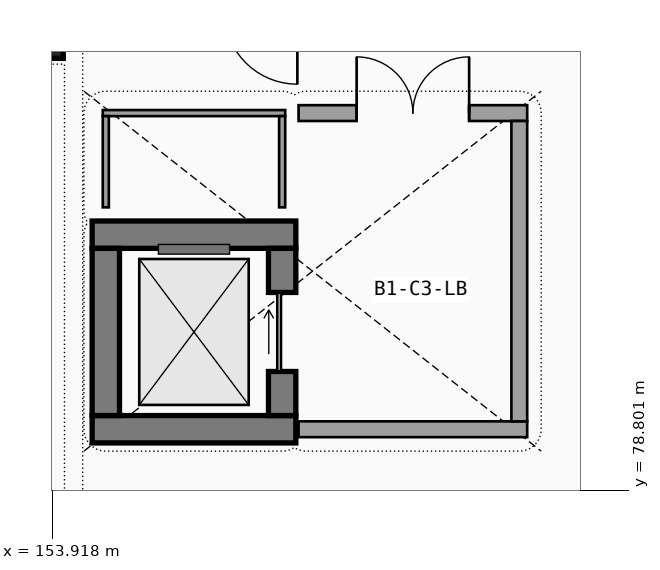
"""IFC4 building model, lengths in metres.
Left out: names, types, materials, properties, quantities, classifications, styles, units other than length and angle.
Written with IfcOpenShell. Run it as: python <this file> out.ifc"""

import sys

from ifc_helpers import new_model, si_unit, direction, frame, frame_2d, origin, origin_2d, place, context, subcontext, project, spatial, rectangle, extrude, element, fill, save


model = new_model("IFC4")
c1 = context("Model", 3, precision=1e-05, world=origin(), true_north=direction((0.0, 1.0)))
c2 = subcontext(c1, "Body", "Model", "MODEL_VIEW")
j1 = project(units=[si_unit("LENGTHUNIT", "METRE"), si_unit("PLANEANGLEUNIT", "RADIAN")], contexts=[c1])
p1 = place(None, origin())
s1 = spatial("IfcSite", under=j1, at=p1, CompositionType="ELEMENT")
p2 = place(p1, origin())
s2 = spatial("IfcBuilding", under=s1, at=p2, CompositionType="ELEMENT")
p3 = place(p2, frame((0.0, 0.0, -4.8)))
s3 = spatial("IfcBuildingStorey", under=s2, at=p3, CompositionType="ELEMENT", Elevation=-4.8)
p4 = place(p3, frame((153.6, 86.4, 0.0), z_axis=(0.0, 0.0, 1.0), x_axis=(1.0, 0.0, 0.0)))
e1 = element("IfcColumn", 1, at=p4, inside=s3, PredefinedType="COLUMN", context=c2, shape_type="SweptSolid", body=[
    extrude(rectangle(XDim=1.0, YDim=1.0, at=origin_2d()), origin(), (0.0, 0.0, 1.0), 4.8),
])
for number, where, z_axis, x_axis in (
    (2, (154.575, 79.8, 0.0), (0.0, 0.0, 1.0), (1.0, 0.0, 0.0)),
    (3, (157.925, 83.0, 0.0), (0.0, 0.0, 1.0), (-1.0, 0.0, 0.0)),
):
    element("IfcWall", number, at=place(p3, frame(where, z_axis=z_axis, x_axis=x_axis)), inside=s3, PredefinedType="SHEAR", context=c2, shape_type="SweptSolid", body=[
        extrude(rectangle(XDim=3.35, YDim=0.45, at=frame_2d((1.675, 0.0))), origin(), (0.0, 0.0, 1.0), 4.5),
    ])
p5 = place(p3, frame((154.8, 82.775, 0.0), z_axis=(0.0, 0.0, 1.0), x_axis=(0.0, -1.0, 0.0)))
e4 = element("IfcWall", 4, at=p5, inside=s3, PredefinedType="SHEAR", context=c2, shape_type="SweptSolid", body=[
    extrude(rectangle(XDim=2.75, YDim=0.45, at=frame_2d((1.375, 0.0))), origin(), (0.0, 0.0, 1.0), 4.5),
])
p6 = place(p3, frame((157.7, 80.025, 0.0), z_axis=(0.0, 0.0, 1.0), x_axis=(0.0, 1.0, 0.0)))
e5 = element("IfcWall", 5, at=p6, inside=s3, PredefinedType="SHEAR", context=c2, shape_type="SweptSolid", body=[
    extrude(rectangle(XDim=2.75, YDim=0.45, at=frame_2d((1.375, 0.0))), origin(), (0.0, 0.0, 1.0), 4.5),
])
p7 = place(p6, frame((0.725, 0.0, 0.0), z_axis=(0.0, 0.0, 1.0), x_axis=(1.0, 0.0, 0.0)))
e6 = element("IfcOpeningElement", 6, at=p7, cuts=e5, PredefinedType="OPENING", context=c2, shape_type="SweptSolid", body=[
    extrude(rectangle(XDim=1.3, YDim=2.25, at=frame_2d((0.65, 1.125))), frame((0.0, 0.235, 0.0), z_axis=(0.0, -1.0, 0.0), x_axis=(1.0, 0.0, 0.0)), (0.0, 0.0, 1.0), 0.47),
])
p8 = place(p3, frame((157.75, 85.0, 0.0), z_axis=(0.0, 0.0, 1.0), x_axis=(-1.0, 0.0, 0.0)))
e7 = element("IfcWall", 7, at=p8, inside=s3, PredefinedType="PARTITIONING", context=c2, shape_type="SweptSolid", body=[
    extrude(rectangle(XDim=3.0, YDim=0.1, at=frame_2d((1.5, 0.0))), origin(), (0.0, 0.0, 1.0), 4.5),
])
for number, where, z_axis, x_axis in (
    (8, (154.8, 84.95, 0.0), (0.0, 0.0, 1.0), (0.0, -1.0, 0.0)),
    (9, (157.7, 83.45, 0.0), (0.0, 0.0, 1.0), (0.0, 1.0, 0.0)),
):
    element("IfcWall", number, at=place(p3, frame(where, z_axis=z_axis, x_axis=x_axis)), inside=s3, PredefinedType="PARTITIONING", context=c2, shape_type="SweptSolid", body=[
        extrude(rectangle(XDim=1.5, YDim=0.1, at=frame_2d((0.75, 0.0))), origin(), (0.0, 0.0, 1.0), 4.5),
    ])
p9 = place(p3, frame((157.97, 79.8, 0.0), z_axis=(0.0, 0.0, 1.0), x_axis=(1.0, 0.0, 0.0)))
e10 = element("IfcWall", 10, at=p9, inside=s3, PredefinedType="SOLIDWALL", context=c2, shape_type="SweptSolid", body=[
    extrude(rectangle(XDim=3.76, YDim=0.26, at=frame_2d((1.88, 0.0))), origin(), (0.0, 0.0, 1.0), 4.5),
])
p10 = place(p3, frame((161.73, 85.0, 0.0), z_axis=(0.0, 0.0, 1.0), x_axis=(-1.0, 0.0, 0.0)))
e11 = element("IfcWall", 11, at=p10, inside=s3, PredefinedType="SOLIDWALL", context=c2, shape_type="SweptSolid", body=[
    extrude(rectangle(XDim=3.76, YDim=0.26, at=frame_2d((1.88, 0.0))), origin(), (0.0, 0.0, 1.0), 4.5),
])
p11 = place(p10, frame((2.805, 0.0, 0.0), z_axis=(0.0, 0.0, 1.0), x_axis=(-1.0, 0.0, 0.0)))
e12 = element("IfcOpeningElement", 12, at=p11, cuts=e11, PredefinedType="OPENING", context=c2, shape_type="SweptSolid", body=[
    extrude(rectangle(XDim=1.85, YDim=2.25, at=frame_2d((0.925, 1.125))), frame((0.0, 0.14, 0.0), z_axis=(0.0, -1.0, 0.0), x_axis=(1.0, 0.0, 0.0)), (0.0, 0.0, 1.0), 0.28),
])
p12 = place(p3, frame((161.6, 79.93, 0.0), z_axis=(0.0, 0.0, 1.0), x_axis=(0.0, 1.0, 0.0)))
e13 = element("IfcWall", 13, at=p12, inside=s3, PredefinedType="SOLIDWALL", context=c2, shape_type="SweptSolid", body=[
    extrude(rectangle(XDim=4.94, YDim=0.26, at=frame_2d((2.47, 0.0))), origin(), (0.0, 0.0, 1.0), 4.5),
])
p13 = place(p7, origin())
e14 = element("IfcDoor", 14, at=p13, inside=s3, OperationType="SLIDING_TO_RIGHT", PredefinedType="DOOR", context=c2, shape_type="SweptSolid", body=[
    extrude(rectangle(XDim=1.3, YDim=2.25, at=frame_2d((0.65, 1.125))), frame((0.0, 0.025, 0.0), z_axis=(0.0, -1.0, 0.0), x_axis=(1.0, 0.0, 0.0)), (0.0, 0.0, 1.0), 0.05),
])
fill(e6, e14)
p14 = place(p11, origin())
e15 = element("IfcDoor", 15, at=p14, inside=s3, OperationType="DOUBLE_DOOR_SINGLE_SWING", PredefinedType="DOOR", context=c2, shape_type="SweptSolid", body=[
    extrude(rectangle(XDim=1.85, YDim=2.25, at=frame_2d((0.925, 1.125))), frame((0.0, 0.025, 0.0), z_axis=(0.0, -1.0, 0.0), x_axis=(1.0, 0.0, 0.0)), (0.0, 0.0, 1.0), 0.05),
])
fill(e12, e15)
save(model, sys.argv[1])
